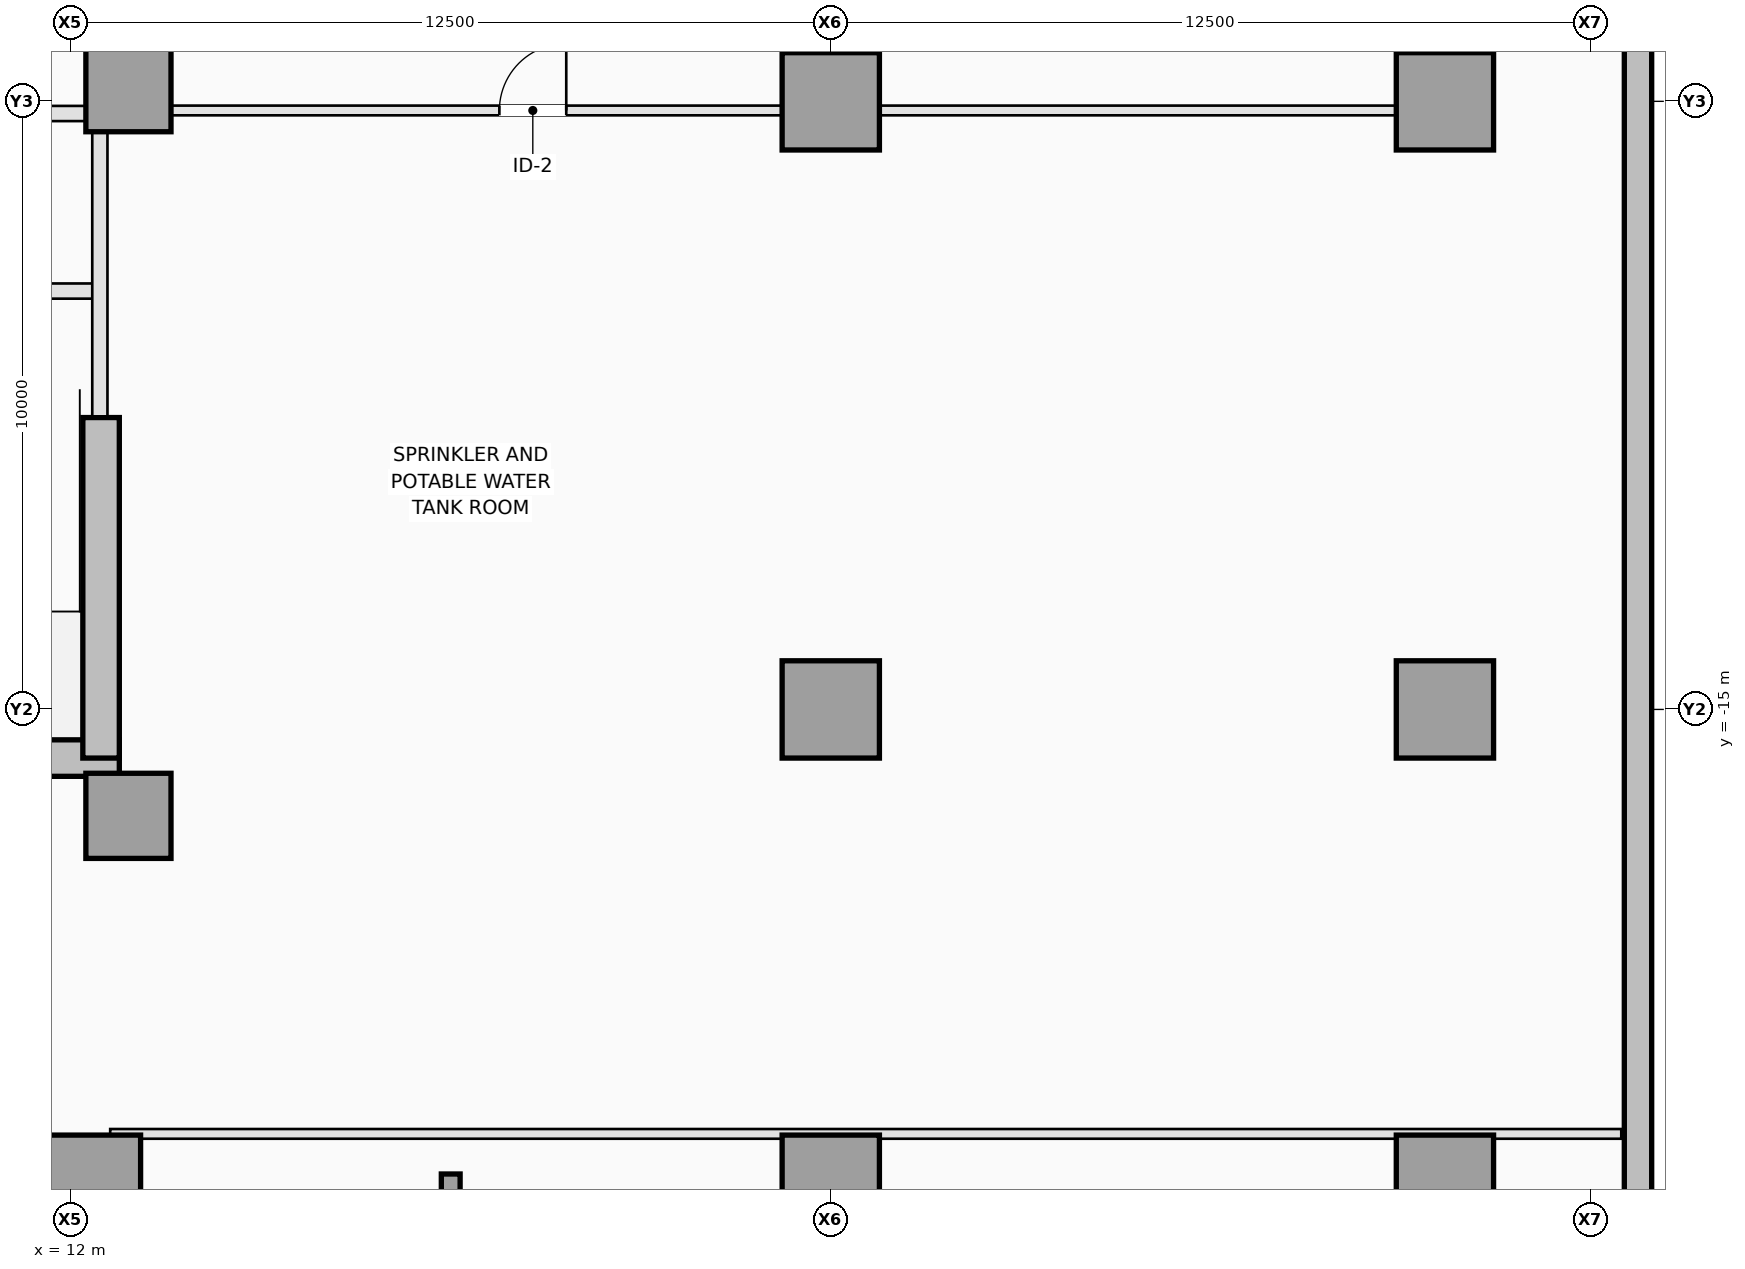
"""IFC4 building model, lengths in metres.
Left out: names, types, materials, properties, quantities, classifications, styles, units other than length and angle.
Written with IfcOpenShell. Run it as: python <this file> out.ifc"""

import sys

from ifc_helpers import new_model, si_unit, direction, frame, frame_2d, origin, origin_2d, place, context, subcontext, project, spatial, rectangle, i_section, extrude, element, fill, save


model = new_model("IFC4")
c1 = context("Model", 3, precision=1e-05, world=origin(), true_north=direction((0.0, 1.0)))
c2 = subcontext(c1, "Body", "Model", "MODEL_VIEW")
j1 = project(units=[si_unit("LENGTHUNIT", "METRE"), si_unit("PLANEANGLEUNIT", "RADIAN")], contexts=[c1])
p1 = place(None, origin())
s1 = spatial("IfcSite", under=j1, at=p1, CompositionType="ELEMENT")
p2 = place(p1, origin())
s2 = spatial("IfcBuilding", under=s1, at=p2, CompositionType="ELEMENT")
p3 = place(p2, frame((0.0, 0.0, -10.0)))
s3 = spatial("IfcBuildingStorey", under=s2, at=p3, CompositionType="ELEMENT", Elevation=-10.0)
p4 = place(p3, frame((37.775, 25.832, 0.0), z_axis=(0.0, 0.0, 1.0), x_axis=(0.0, -1.0, 0.0)))
e1 = element("IfcWall", 1, at=p4, inside=s3, PredefinedType="USERDEFINED", context=c2, shape_type="SweptSolid", body=[
    extrude(rectangle(XDim=51.438, YDim=0.45, at=frame_2d((25.719, 0.0))), origin(), (0.0, 0.0, 1.0), 5.0),
])
p5 = place(p3, frame((8.6, -15.8, 0.0), z_axis=(0.0, 0.0, 1.0), x_axis=(1.0, 0.0, 0.0)))
e2 = element("IfcWall", 2, at=p5, inside=s3, PredefinedType="SHEAR", context=c2, shape_type="SweptSolid", body=[
    extrude(rectangle(XDim=4.2, YDim=0.6, at=frame_2d((2.1, 0.0))), origin(), (0.0, 0.0, 1.0), 5.0),
])
p6 = place(p3, frame((12.5, -15.8, 0.0), z_axis=(0.0, 0.0, 1.0), x_axis=(0.0, 1.0, 0.0)))
e3 = element("IfcWall", 3, at=p6, inside=s3, PredefinedType="SHEAR", context=c2, shape_type="SweptSolid", body=[
    extrude(rectangle(XDim=5.6, YDim=0.6, at=frame_2d((2.8, 0.0))), origin(), (0.0, 0.0, 1.0), 5.0),
])
for number, where, z_axis, x_axis in (
    (4, (12.95, -16.75, -0.45), (0.0, 0.0, 1.0), (1.0, 0.0, 0.0)),
    (5, (12.95, -4.8, -0.45), (0.0, 0.0, 1.0), (1.0, 0.0, 0.0)),
):
    element("IfcColumn", number, at=place(p3, frame(where, z_axis=z_axis, x_axis=x_axis)), inside=s3, PredefinedType="COLUMN", context=c2, shape_type="SweptSolid", body=[
        extrude(rectangle(XDim=1.4, YDim=1.4, at=origin_2d()), origin(), (0.0, 0.0, 1.0), 5.45),
    ])
for number, where, z_axis, x_axis in (
    (6, (12.35, -22.8, -0.45), (0.0, 0.0, 1.0), (1.0, 0.0, 0.0)),
    (7, (24.5, -22.8, -0.45), (0.0, 0.0, 1.0), (1.0, 0.0, 0.0)),
    (8, (34.6, -22.8, -0.45), (0.0, 0.0, 1.0), (1.0, 0.0, 0.0)),
    (9, (24.5, -15.0, -0.45), (0.0, 0.0, 1.0), (1.0, 0.0, 0.0)),
    (10, (34.6, -15.0, -0.45), (0.0, 0.0, 1.0), (1.0, 0.0, 0.0)),
    (11, (24.5, -5.0, -0.45), (0.0, 0.0, 1.0), (1.0, 0.0, 0.0)),
    (12, (34.6, -5.0, -0.45), (0.0, 0.0, 1.0), (1.0, 0.0, 0.0)),
):
    element("IfcColumn", number, at=place(p3, frame(where, z_axis=z_axis, x_axis=x_axis)), inside=s3, PredefinedType="COLUMN", context=c2, shape_type="SweptSolid", body=[
        extrude(rectangle(XDim=1.6, YDim=1.6, at=origin_2d()), origin(), (0.0, 0.0, 1.0), 5.45),
    ])
p7 = place(p3, frame((18.25, -22.8, -0.45), z_axis=(0.0, 0.0, 1.0), x_axis=(1.0, 0.0, 0.0)))
e13 = element("IfcColumn", 13, at=p7, inside=s3, PredefinedType="COLUMN", context=c2, shape_type="SweptSolid", body=[
    extrude(i_section(OverallWidth=0.309, OverallDepth=0.321, WebThickness=0.014, FlangeThickness=0.022, FilletRadius=0.017, at=origin_2d()), origin(), (0.0, 0.0, 1.0), 5.45),
])
p8 = place(p3, frame((9.16, -8.12, 0.0), z_axis=(0.0, 0.0, 1.0), x_axis=(1.0, 0.0, 0.0)))
e14 = element("IfcWall", 14, at=p8, inside=s3, PredefinedType="PARTITIONING", context=c2, shape_type="SweptSolid", body=[
    extrude(rectangle(XDim=3.22, YDim=0.25, at=frame_2d((1.61, 0.0))), origin(), (0.0, 0.0, 1.0), 4.68),
])
p9 = place(p3, frame((12.48, -10.18, 0.0), z_axis=(0.0, 0.0, 1.0), x_axis=(0.0, 1.0, 0.0)))
e15 = element("IfcWall", 15, at=p9, inside=s3, PredefinedType="PARTITIONING", context=c2, shape_type="SweptSolid", body=[
    extrude(rectangle(XDim=4.678, YDim=0.25, at=frame_2d((2.339, 0.0))), origin(), (0.0, 0.0, 1.0), 4.68),
])
p10 = place(p3, frame((4.452, -5.2, 0.0), z_axis=(0.0, 0.0, 1.0), x_axis=(1.0, 0.0, 0.0)))
e16 = element("IfcWall", 16, at=p10, inside=s3, PredefinedType="PARTITIONING", context=c2, shape_type="SweptSolid", body=[
    extrude(rectangle(XDim=7.796, YDim=0.25, at=frame_2d((3.898, 0.0))), origin(), (0.0, 0.0, 1.0), 4.68),
])
p11 = place(p10, frame((2.898, 0.0, 0.0)))
e17 = element("IfcOpeningElement", 17, at=p11, cuts=e16, PredefinedType="OPENING", context=c2, shape_type="SweptSolid", body=[
    extrude(rectangle(XDim=1.05, YDim=2.12, at=frame_2d((0.525, 1.06))), frame((0.0, 0.135, 0.0), z_axis=(0.0, -1.0, 0.0), x_axis=(1.0, 0.0, 0.0)), (0.0, 0.0, 1.0), 0.27),
])
p12 = place(p3, frame((12.65, -21.98, 0.0), z_axis=(0.0, 0.0, 1.0), x_axis=(1.0, 0.0, 0.0)))
e18 = element("IfcWall", 18, at=p12, inside=s3, PredefinedType="PARTITIONING", context=c2, shape_type="SweptSolid", body=[
    extrude(rectangle(XDim=24.85, YDim=0.16, at=frame_2d((12.425, 0.0))), origin(), (0.0, 0.0, 1.0), 4.68),
])
p13 = place(p3, frame((13.652, -5.15, 0.0), z_axis=(0.0, 0.0, 1.0), x_axis=(1.0, 0.0, 0.0)))
e19 = element("IfcWall", 19, at=p13, inside=s3, PredefinedType="PARTITIONING", context=c2, shape_type="SweptSolid", body=[
    extrude(rectangle(XDim=10.046, YDim=0.16, at=frame_2d((5.023, 0.0))), origin(), (0.0, 0.0, 1.0), 3.656),
])
p14 = place(p13, frame((5.398, 0.0, 0.0)))
e20 = element("IfcOpeningElement", 20, at=p14, cuts=e19, PredefinedType="OPENING", context=c2, shape_type="SweptSolid", body=[
    extrude(rectangle(XDim=1.1, YDim=2.15, at=frame_2d((0.55, 1.075))), frame((0.0, 0.09, 0.0), z_axis=(0.0, -1.0, 0.0), x_axis=(1.0, 0.0, 0.0)), (0.0, 0.0, 1.0), 0.18),
])
p15 = place(p3, frame((25.302, -5.15, 0.0), z_axis=(0.0, 0.0, 1.0), x_axis=(1.0, 0.0, 0.0)))
e21 = element("IfcWall", 21, at=p15, inside=s3, PredefinedType="PARTITIONING", context=c2, shape_type="SweptSolid", body=[
    extrude(rectangle(XDim=8.496, YDim=0.16, at=frame_2d((4.248, 0.0))), origin(), (0.0, 0.0, 1.0), 3.656),
])
p16 = place(p14, origin())
e22 = element("IfcDoor", 22, at=p16, inside=s3, OperationType="SINGLE_SWING_RIGHT", PredefinedType="DOOR", context=c2, shape_type="SweptSolid", body=[
    extrude(rectangle(XDim=1.1, YDim=2.15, at=frame_2d((0.55, 1.075))), frame((0.0, 0.025, 0.0), z_axis=(0.0, -1.0, 0.0), x_axis=(1.0, 0.0, 0.0)), (0.0, 0.0, 1.0), 0.05),
])
fill(e20, e22)
save(model, sys.argv[1])
